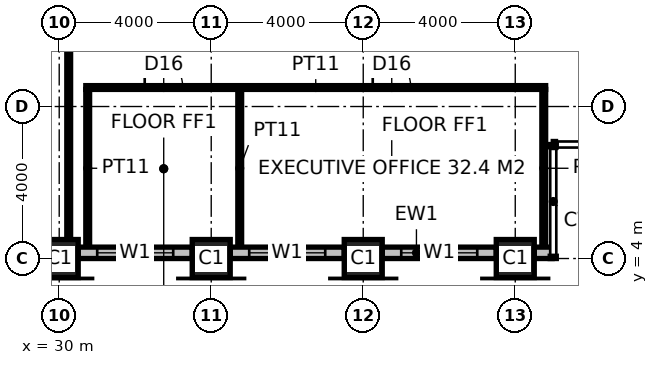
"""IFC4 building model, lengths in metres.
Left out: names, types, materials, properties, quantities, classifications, styles, units other than length and angle.
Written with IfcOpenShell. Run it as: python <this file> out.ifc"""

import sys

from ifc_helpers import new_model, si_unit, direction, frame, frame_2d, origin, origin_2d, place, context, subcontext, project, spatial, rectangle, hollow_rectangle, extrude, element, fill, save


model = new_model("IFC4")
c1 = context("Model", 3, precision=1e-05, world=origin(), true_north=direction((0.0, 1.0)))
c2 = subcontext(c1, "Body", "Model", "MODEL_VIEW")
j1 = project(units=[si_unit("LENGTHUNIT", "METRE"), si_unit("PLANEANGLEUNIT", "RADIAN")], contexts=[c1])
p1 = place(None, origin())
s1 = spatial("IfcSite", under=j1, at=p1, CompositionType="ELEMENT")
p2 = place(p1, origin())
s2 = spatial("IfcBuilding", under=s1, at=p2, CompositionType="ELEMENT")
p3 = place(p2, frame((0.0, 0.0, 278.2)))
s3 = spatial("IfcBuildingStorey", under=s2, at=p3, CompositionType="ELEMENT", Elevation=278.2)
for number, where, z_axis, x_axis in (
    (1, (30.0, 4.0, 0.0), (0.0, 0.0, 1.0), (1.0, 0.0, 0.0)),
    (2, (34.0, 4.0, 0.0), (0.0, 0.0, 1.0), (1.0, 0.0, 0.0)),
    (3, (38.0, 4.0, 0.0), (0.0, 0.0, 1.0), (1.0, 0.0, 0.0)),
    (4, (42.0, 4.0, 0.0), (0.0, 0.0, 1.0), (1.0, 0.0, 0.0)),
):
    element("IfcColumn", number, at=place(p3, frame(where, z_axis=z_axis, x_axis=x_axis)), inside=s3, PredefinedType="COLUMN", context=c2, shape_type="SweptSolid", body=[
        extrude(hollow_rectangle(XDim=1.0, YDim=1.0, WallThickness=0.1, at=origin_2d()), origin(), (0.0, 0.0, 1.0), 4.0),
    ])
p4 = place(p3, frame((30.7, 8.5, 0.0), z_axis=(0.0, 0.0, 1.0), x_axis=(1.0, 0.0, 0.0)))
e5 = element("IfcWall", 5, at=p4, inside=s3, PredefinedType="PARTITIONING", context=c2, shape_type="SweptSolid", body=[
    extrude(rectangle(XDim=12.1, YDim=0.1, at=frame_2d((6.05, 0.0))), origin(), (0.0, 0.0, 1.0), 3.85),
])
p5 = place(p4, frame((1.55, 0.0, 0.0)))
e6 = element("IfcOpeningElement", 6, at=p5, cuts=e5, PredefinedType="OPENING", context=c2, shape_type="SweptSolid", body=[
    extrude(rectangle(XDim=1.0, YDim=2.2, at=frame_2d((0.5, 1.1))), frame((0.0, 0.06, 0.0), z_axis=(0.0, -1.0, 0.0), x_axis=(1.0, 0.0, 0.0)), (0.0, 0.0, 1.0), 0.12),
])
p6 = place(p4, frame((7.55, 0.0, 0.0)))
e7 = element("IfcOpeningElement", 7, at=p6, cuts=e5, PredefinedType="OPENING", context=c2, shape_type="SweptSolid", body=[
    extrude(rectangle(XDim=1.0, YDim=2.2, at=frame_2d((0.5, 1.1))), frame((0.0, 0.06, 0.0), z_axis=(0.0, -1.0, 0.0), x_axis=(1.0, 0.0, 0.0)), (0.0, 0.0, 1.0), 0.12),
])
for number, where, z_axis, x_axis in (
    (8, (30.75, 4.3, 0.0), (0.0, 0.0, 1.0), (0.0, 1.0, 0.0)),
    (9, (34.75, 4.3, 0.0), (0.0, 0.0, 1.0), (0.0, 1.0, 0.0)),
    (10, (42.75, 4.3, 0.0), (0.0, 0.0, 1.0), (0.0, 1.0, 0.0)),
):
    element("IfcWall", number, at=place(p3, frame(where, z_axis=z_axis, x_axis=x_axis)), inside=s3, PredefinedType="PARTITIONING", context=c2, shape_type="SweptSolid", body=[
        extrude(rectangle(XDim=4.15, YDim=0.1, at=frame_2d((2.075, 0.0))), origin(), (0.0, 0.0, 1.0), 3.85),
    ])
p7 = place(p3, frame((30.25, 15.7, 0.0), z_axis=(0.0, 0.0, 1.0), x_axis=(0.0, -1.0, 0.0)))
e11 = element("IfcWall", 11, at=p7, inside=s3, PredefinedType="PARTITIONING", context=c2, shape_type="SweptSolid", body=[
    extrude(rectangle(XDim=11.4, YDim=0.1, at=frame_2d((5.7, 0.0))), origin(), (0.0, 0.0, 1.0), 3.85),
])
p8 = place(p7, frame((5.2, 0.0, 0.0)))
e12 = element("IfcOpeningElement", 12, at=p8, cuts=e11, PredefinedType="OPENING", context=c2, shape_type="SweptSolid", body=[
    extrude(rectangle(XDim=1.0, YDim=2.2, at=frame_2d((0.5, 1.1))), frame((0.0, 0.06, 0.0), z_axis=(0.0, -1.0, 0.0), x_axis=(1.0, 0.0, 0.0)), (0.0, 0.0, 1.0), 0.12),
])
p9 = place(p3, frame((30.5, 4.15, 0.0), z_axis=(0.0, 0.0, 1.0), x_axis=(1.0, 0.0, 0.0)))
e13 = element("IfcWall", 13, at=p9, inside=s3, PredefinedType="ELEMENTEDWALL", context=c2, shape_type="SweptSolid", body=[
    extrude(rectangle(XDim=3.0, YDim=0.3, at=frame_2d((1.5, 0.0))), origin(), (0.0, 0.0, 1.0), 2.85),
])
p10 = place(p9, frame((0.5, 0.0, 0.8)))
e14 = element("IfcOpeningElement", 14, at=p10, cuts=e13, PredefinedType="OPENING", context=c2, shape_type="SweptSolid", body=[
    extrude(rectangle(XDim=2.0, YDim=2.0, at=frame_2d((1.0, 1.0))), frame((0.0, 0.16, 0.0), z_axis=(0.0, -1.0, 0.0), x_axis=(1.0, 0.0, 0.0)), (0.0, 0.0, 1.0), 0.32),
])
p11 = place(p3, frame((34.5, 4.15, 0.0), z_axis=(0.0, 0.0, 1.0), x_axis=(1.0, 0.0, 0.0)))
e15 = element("IfcWall", 15, at=p11, inside=s3, PredefinedType="ELEMENTEDWALL", context=c2, shape_type="SweptSolid", body=[
    extrude(rectangle(XDim=3.0, YDim=0.3, at=frame_2d((1.5, 0.0))), origin(), (0.0, 0.0, 1.0), 2.85),
])
p12 = place(p11, frame((0.5, 0.0, 0.8)))
e16 = element("IfcOpeningElement", 16, at=p12, cuts=e15, PredefinedType="OPENING", context=c2, shape_type="SweptSolid", body=[
    extrude(rectangle(XDim=2.0, YDim=2.0, at=frame_2d((1.0, 1.0))), frame((0.0, 0.16, 0.0), z_axis=(0.0, -1.0, 0.0), x_axis=(1.0, 0.0, 0.0)), (0.0, 0.0, 1.0), 0.32),
])
p13 = place(p3, frame((38.5, 4.15, 0.0), z_axis=(0.0, 0.0, 1.0), x_axis=(1.0, 0.0, 0.0)))
e17 = element("IfcWall", 17, at=p13, inside=s3, PredefinedType="ELEMENTEDWALL", context=c2, shape_type="SweptSolid", body=[
    extrude(rectangle(XDim=3.0, YDim=0.3, at=frame_2d((1.5, 0.0))), origin(), (0.0, 0.0, 1.0), 2.85),
])
p14 = place(p13, frame((0.5, 0.0, 0.8)))
e18 = element("IfcOpeningElement", 18, at=p14, cuts=e17, PredefinedType="OPENING", context=c2, shape_type="SweptSolid", body=[
    extrude(rectangle(XDim=2.0, YDim=2.0, at=frame_2d((1.0, 1.0))), frame((0.0, 0.16, 0.0), z_axis=(0.0, -1.0, 0.0), x_axis=(1.0, 0.0, 0.0)), (0.0, 0.0, 1.0), 0.32),
])
p15 = place(p3, frame((42.5, 4.15, 0.0), z_axis=(0.0, 0.0, 1.0), x_axis=(1.0, 0.0, 0.0)))
e19 = element("IfcWall", 19, at=p15, inside=s3, PredefinedType="ELEMENTEDWALL", context=c2, shape_type="SweptSolid", body=[
    extrude(rectangle(XDim=0.47, YDim=0.3, at=frame_2d((0.235, 0.0))), origin(), (0.0, 0.0, 1.0), 2.95),
])
p16 = place(p5, origin())
e20 = element("IfcDoor", 20, at=p16, inside=s3, OperationType="SINGLE_SWING_LEFT", PredefinedType="DOOR", context=c2, shape_type="SweptSolid", body=[
    extrude(rectangle(XDim=1.0, YDim=2.2, at=frame_2d((0.5, 1.1))), frame((0.0, 0.025, 0.0), z_axis=(0.0, -1.0, 0.0), x_axis=(1.0, 0.0, 0.0)), (0.0, 0.0, 1.0), 0.05),
])
fill(e6, e20)
p17 = place(p6, origin())
e21 = element("IfcDoor", 21, at=p17, inside=s3, OperationType="SINGLE_SWING_LEFT", PredefinedType="DOOR", context=c2, shape_type="SweptSolid", body=[
    extrude(rectangle(XDim=1.0, YDim=2.2, at=frame_2d((0.5, 1.1))), frame((0.0, 0.025, 0.0), z_axis=(0.0, -1.0, 0.0), x_axis=(1.0, 0.0, 0.0)), (0.0, 0.0, 1.0), 0.05),
])
fill(e7, e21)
p18 = place(p10, origin())
e22 = element("IfcWindow", 22, at=p18, inside=s3, PartitioningType="SINGLE_PANEL", PredefinedType="WINDOW", context=c2, shape_type="SweptSolid", body=[
    extrude(rectangle(XDim=2.0, YDim=2.0, at=frame_2d((1.0, 1.0))), frame((0.0, 0.03, 0.0), z_axis=(0.0, -1.0, 0.0), x_axis=(1.0, 0.0, 0.0)), (0.0, 0.0, 1.0), 0.06),
])
fill(e14, e22)
p19 = place(p12, origin())
e23 = element("IfcWindow", 23, at=p19, inside=s3, PartitioningType="SINGLE_PANEL", PredefinedType="WINDOW", context=c2, shape_type="SweptSolid", body=[
    extrude(rectangle(XDim=2.0, YDim=2.0, at=frame_2d((1.0, 1.0))), frame((0.0, 0.03, 0.0), z_axis=(0.0, -1.0, 0.0), x_axis=(1.0, 0.0, 0.0)), (0.0, 0.0, 1.0), 0.06),
])
fill(e16, e23)
p20 = place(p14, origin())
e24 = element("IfcWindow", 24, at=p20, inside=s3, PartitioningType="SINGLE_PANEL", PredefinedType="WINDOW", context=c2, shape_type="SweptSolid", body=[
    extrude(rectangle(XDim=2.0, YDim=2.0, at=frame_2d((1.0, 1.0))), frame((0.0, 0.03, 0.0), z_axis=(0.0, -1.0, 0.0), x_axis=(1.0, 0.0, 0.0)), (0.0, 0.0, 1.0), 0.06),
])
fill(e18, e24)
save(model, sys.argv[1])
